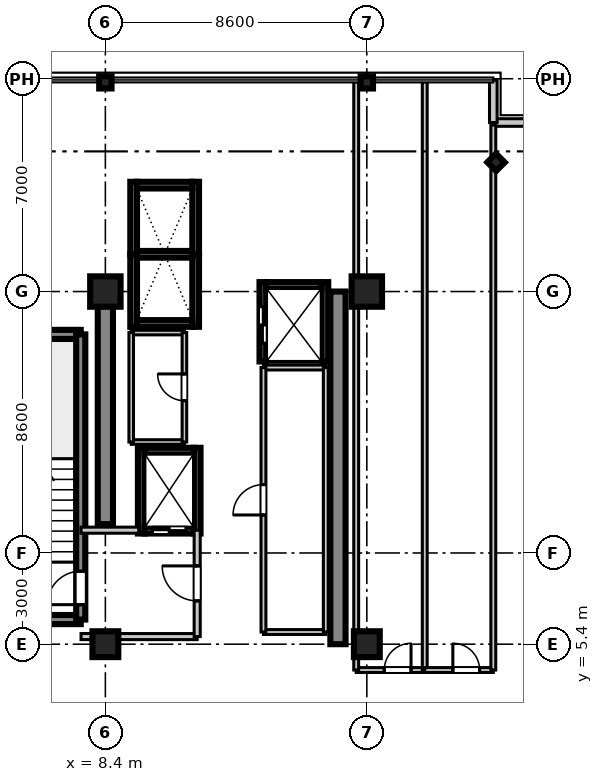
"""IFC4 building model, lengths in metres.
Left out: names, types, materials, properties, quantities, classifications, styles, units other than length and angle.
Written with IfcOpenShell. Run it as: python <this file> out.ifc"""

import sys

from ifc_helpers import new_model, si_unit, direction, frame, frame_2d, origin, origin_2d, place, context, subcontext, project, spatial, rectangle, i_section, extrude, source, transform, mapped, element, fill, save


model = new_model("IFC4")
c1 = context("Model", 3, precision=1e-05, world=origin(), true_north=direction((0.0, 1.0)))
c2 = subcontext(c1, "Body", "Model", "MODEL_VIEW")
j1 = project(units=[si_unit("LENGTHUNIT", "METRE"), si_unit("PLANEANGLEUNIT", "RADIAN")], contexts=[c1])
p1 = place(None, origin())
s1 = spatial("IfcSite", under=j1, at=p1, CompositionType="ELEMENT")
p2 = place(p1, origin())
s2 = spatial("IfcBuilding", under=s1, at=p2, CompositionType="ELEMENT")
p3 = place(p2, frame((0.0, 0.0, 204.9)))
s3 = spatial("IfcBuildingStorey", under=s2, at=p3, CompositionType="ELEMENT", Elevation=204.9)
m1 = source(origin(), c2, "Body", "SweptSolid", [
    extrude(rectangle(XDim=0.85, YDim=0.85, at=origin_2d()), origin(), (0.0, 0.0, 1.0), 3.655),
])
p4 = place(p3, frame((8.4, 5.4, 0.0), z_axis=(0.0, 0.0, 1.0), x_axis=(1.0, 0.0, 0.0)))
e1 = element("IfcColumn", 1, at=p4, inside=s3, PredefinedType="PILASTER", context=c2, shape_type="MappedRepresentation", body=[
    mapped(m1, transform((0.0, 0.0, 0.0), scale=1.0)),
])
m2 = source(origin(), c2, "Body", "SweptSolid", [
    extrude(rectangle(XDim=1.0, YDim=1.0, at=origin_2d()), origin(), (0.0, 0.0, 1.0), 3.655),
])
p5 = place(p3, frame((8.4, 17.0, 0.0), z_axis=(0.0, 0.0, 1.0), x_axis=(1.0, 0.0, 0.0)))
e2 = element("IfcColumn", 2, at=p5, inside=s3, PredefinedType="COLUMN", context=c2, shape_type="MappedRepresentation", body=[
    mapped(m2, transform((0.0, 0.0, 0.0), scale=1.0)),
])
p6 = place(p3, frame((17.0, 5.4, 0.0), z_axis=(0.0, 0.0, 1.0), x_axis=(1.0, 0.0, 0.0)))
e3 = element("IfcColumn", 3, at=p6, inside=s3, PredefinedType="PILASTER", context=c2, shape_type="MappedRepresentation", body=[
    mapped(m1, transform((0.0, 0.0, 0.0), scale=1.0)),
])
p7 = place(p3, frame((17.0, 17.0, 0.0), z_axis=(0.0, 0.0, 1.0), x_axis=(1.0, 0.0, 0.0)))
e4 = element("IfcColumn", 4, at=p7, inside=s3, PredefinedType="COLUMN", context=c2, shape_type="MappedRepresentation", body=[
    mapped(m2, transform((0.0, 0.0, 0.0), scale=1.0)),
])
m3 = source(origin(), c2, "Body", "SweptSolid", [
    extrude(i_section(OverallWidth=0.401, OverallDepth=0.406, WebThickness=0.016, FlangeThickness=0.025, at=origin_2d()), origin(), (0.0, 0.0, 1.0), 3.655),
])
for number, where, z_axis, x_axis in (
    (5, (8.4, 23.88, 0.0), (0.0, 0.0, 1.0), (0.0, 1.0, 0.0)),
    (6, (17.0, 23.88, 0.0), (0.0, 0.0, 1.0), (0.0, 1.0, 0.0)),
    (7, (21.25, 21.25, 0.0), (0.0, 0.0, 1.0), (0.707, 0.707, 0.0)),
):
    element("IfcColumn", number, at=place(p3, frame(where, z_axis=z_axis, x_axis=x_axis)), inside=s3, PredefinedType="COLUMN", context=c2, shape_type="MappedRepresentation", body=[
        mapped(m3, transform((0.0, 0.0, 0.0), scale=1.0)),
    ])
m4 = source(origin(), c2, "Body", "SweptSolid", [
    extrude(rectangle(XDim=7.65, YDim=0.5, at=frame_2d((3.825, 0.0))), origin(), (0.0, 0.0, 1.0), 3.41),
])
p8 = place(p3, frame((8.4, 9.35, 0.0), z_axis=(0.0, 0.0, 1.0), x_axis=(0.0, 1.0, 0.0)))
e8 = element("IfcWall", 8, at=p8, inside=s3, PredefinedType="SHEAR", context=c2, shape_type="MappedRepresentation", body=[
    mapped(m4, transform((0.0, 0.0, 0.0), scale=1.0)),
])
m5 = source(origin(), c2, "Body", "SweptSolid", [
    extrude(rectangle(XDim=11.6, YDim=0.5, at=frame_2d((5.8, 0.0))), origin(), (0.0, 0.0, 1.0), 3.41),
])
p9 = place(p3, frame((16.05, 5.4, 0.0), z_axis=(0.0, 0.0, 1.0), x_axis=(0.0, 1.0, 0.0)))
e9 = element("IfcWall", 9, at=p9, inside=s3, PredefinedType="SHEAR", context=c2, shape_type="MappedRepresentation", body=[
    mapped(m5, transform((0.0, 0.0, 0.0), scale=1.0)),
])
m6 = source(origin(), c2, "Body", "SweptSolid", [
    extrude(rectangle(XDim=3.98, YDim=0.3, at=frame_2d((1.99, 0.0))), origin(), (0.0, 0.0, 1.0), 3.41),
])
for number, where, z_axis, x_axis in (
    (10, (3.61, 6.21, 0.0), (0.0, 0.0, 1.0), (1.0, 0.0, 0.0)),
    (11, (3.61, 15.59, 0.0), (0.0, 0.0, 1.0), (1.0, 0.0, 0.0)),
):
    element("IfcWall", number, at=place(p3, frame(where, z_axis=z_axis, x_axis=x_axis)), inside=s3, PredefinedType="SHEAR", context=c2, shape_type="MappedRepresentation", body=[
        mapped(m6, transform((0.0, 0.0, 0.0), scale=1.0)),
    ])
m7 = source(origin(), c2, "Body", "SweptSolid", [
    extrude(rectangle(XDim=9.38, YDim=0.3, at=frame_2d((4.69, 0.0))), origin(), (0.0, 0.0, 1.0), 3.41),
])
p10 = place(p3, frame((7.59, 6.21, 0.0), z_axis=(0.0, 0.0, 1.0), x_axis=(0.0, 1.0, 0.0)))
e12 = element("IfcWall", 12, at=p10, inside=s3, PredefinedType="SHEAR", context=c2, shape_type="MappedRepresentation", body=[
    mapped(m7, transform((0.0, 0.0, 0.0), scale=1.0)),
])
p11 = place(p10, frame((0.49, 0.0, 0.0)))
e13 = element("IfcOpeningElement", 13, at=p11, cuts=e12, PredefinedType="OPENING", context=c2, shape_type="SweptSolid", body=[
    extrude(rectangle(XDim=1.1, YDim=2.15, at=frame_2d((0.55, 1.075))), frame((0.0, 0.16, 0.0), z_axis=(0.0, -1.0, 0.0), x_axis=(1.0, 0.0, 0.0)), (0.0, 0.0, 1.0), 0.32),
])
m8 = source(origin(), c2, "Body", "SweptSolid", [
    extrude(rectangle(XDim=2.385, YDim=0.22, at=frame_2d((1.192, 0.0))), origin(), (0.0, 0.0, 1.0), 3.41),
])
for number, where, z_axis, x_axis in (
    (14, (9.33, 15.84, 0.0), (0.0, 0.0, 1.0), (0.0, 1.0, 0.0)),
    (15, (11.37, 15.84, 0.0), (0.0, 0.0, 1.0), (0.0, 1.0, 0.0)),
):
    element("IfcWall", number, at=place(p3, frame(where, z_axis=z_axis, x_axis=x_axis)), inside=s3, PredefinedType="SHEAR", context=c2, shape_type="MappedRepresentation", body=[
        mapped(m8, transform((0.0, 0.0, 0.0), scale=1.0)),
    ])
m9 = source(origin(), c2, "Body", "SweptSolid", [
    extrude(rectangle(XDim=1.82, YDim=0.22, at=frame_2d((0.91, 0.0))), origin(), (0.0, 0.0, 1.0), 3.41),
])
p12 = place(p3, frame((9.44, 15.95, 0.0), z_axis=(0.0, 0.0, 1.0), x_axis=(1.0, 0.0, 0.0)))
e16 = element("IfcWall", 16, at=p12, inside=s3, PredefinedType="SHEAR", context=c2, shape_type="MappedRepresentation", body=[
    mapped(m9, transform((0.0, 0.0, 0.0), scale=1.0)),
])
m10 = source(origin(), c2, "Body", "SweptSolid", [
    extrude(rectangle(XDim=1.82, YDim=0.22, at=frame_2d((0.91, 0.0))), origin(), (0.0, 0.0, 1.0), 3.7),
])
p13 = place(p3, frame((9.44, 18.225, 0.0), z_axis=(0.0, 0.0, 1.0), x_axis=(1.0, 0.0, 0.0)))
e17 = element("IfcWall", 17, at=p13, inside=s3, PredefinedType="SHEAR", context=c2, shape_type="MappedRepresentation", body=[
    mapped(m10, transform((0.0, 0.0, 0.0), scale=1.0)),
])
for number, where, z_axis, x_axis in (
    (18, (9.33, 18.225, 0.0), (0.0, 0.0, 1.0), (0.0, 1.0, 0.0)),
    (19, (11.37, 18.225, 0.0), (0.0, 0.0, 1.0), (0.0, 1.0, 0.0)),
):
    element("IfcWall", number, at=place(p3, frame(where, z_axis=z_axis, x_axis=x_axis)), inside=s3, PredefinedType="SHEAR", context=c2, shape_type="MappedRepresentation", body=[
        mapped(m8, transform((0.0, 0.0, 0.0), scale=1.0)),
    ])
p14 = place(p3, frame((9.44, 20.5, 0.0), z_axis=(0.0, 0.0, 1.0), x_axis=(1.0, 0.0, 0.0)))
e20 = element("IfcWall", 20, at=p14, inside=s3, PredefinedType="SHEAR", context=c2, shape_type="MappedRepresentation", body=[
    mapped(m9, transform((0.0, 0.0, 0.0), scale=1.0)),
])
m11 = source(origin(), c2, "Body", "SweptSolid", [
    extrude(rectangle(XDim=2.82, YDim=0.22, at=frame_2d((1.41, 0.0))), origin(), (0.0, 0.0, 1.0), 3.41),
])
for number, where, z_axis, x_axis in (
    (21, (9.58, 9.04, 0.0), (0.0, 0.0, 1.0), (0.0, 1.0, 0.0)),
    (22, (11.42, 9.04, 0.0), (0.0, 0.0, 1.0), (0.0, 1.0, 0.0)),
):
    element("IfcWall", number, at=place(p3, frame(where, z_axis=z_axis, x_axis=x_axis)), inside=s3, PredefinedType="SHEAR", context=c2, shape_type="MappedRepresentation", body=[
        mapped(m11, transform((0.0, 0.0, 0.0), scale=1.0)),
    ])
m12 = source(origin(), c2, "Body", "SweptSolid", [
    extrude(rectangle(XDim=1.62, YDim=0.22, at=frame_2d((0.81, 0.0))), origin(), (0.0, 0.0, 1.0), 3.41),
])
p15 = place(p3, frame((9.69, 9.15, 0.0), z_axis=(0.0, 0.0, 1.0), x_axis=(1.0, 0.0, 0.0)))
e23 = element("IfcWall", 23, at=p15, inside=s3, PredefinedType="SHEAR", context=c2, shape_type="MappedRepresentation", body=[
    mapped(m12, transform((0.0, 0.0, 0.0), scale=1.0)),
])
p16 = place(p15, frame((0.26, 0.0, 0.0)))
e24 = element("IfcOpeningElement", 24, at=p16, cuts=e23, PredefinedType="OPENING", context=c2, shape_type="SweptSolid", body=[
    extrude(rectangle(XDim=1.1, YDim=2.2, at=frame_2d((0.55, 1.1))), frame((0.0, 0.12, 0.0), z_axis=(0.0, -1.0, 0.0), x_axis=(1.0, 0.0, 0.0)), (0.0, 0.0, 1.0), 0.24),
])
p17 = place(p3, frame((9.69, 11.75, 0.0), z_axis=(0.0, 0.0, 1.0), x_axis=(1.0, 0.0, 0.0)))
e25 = element("IfcWall", 25, at=p17, inside=s3, PredefinedType="SHEAR", context=c2, shape_type="MappedRepresentation", body=[
    mapped(m12, transform((0.0, 0.0, 0.0), scale=1.0)),
])
m13 = source(origin(), c2, "Body", "SweptSolid", [
    extrude(rectangle(XDim=2.61, YDim=0.22, at=frame_2d((1.305, 0.0))), origin(), (0.0, 0.0, 1.0), 3.41),
])
p18 = place(p3, frame((13.58, 14.7, 0.0), z_axis=(0.0, 0.0, 1.0), x_axis=(0.0, 1.0, 0.0)))
e26 = element("IfcWall", 26, at=p18, inside=s3, PredefinedType="SHEAR", context=c2, shape_type="MappedRepresentation", body=[
    mapped(m13, transform((0.0, 0.0, 0.0), scale=1.0)),
])
p19 = place(p18, frame((0.6, 0.0, 0.0)))
e27 = element("IfcOpeningElement", 27, at=p19, cuts=e26, PredefinedType="OPENING", context=c2, shape_type="SweptSolid", body=[
    extrude(rectangle(XDim=1.2, YDim=2.2, at=frame_2d((0.6, 1.1))), frame((0.0, 0.12, 0.0), z_axis=(0.0, -1.0, 0.0), x_axis=(1.0, 0.0, 0.0)), (0.0, 0.0, 1.0), 0.24),
])
p20 = place(p3, frame((15.62, 14.7, 0.0), z_axis=(0.0, 0.0, 1.0), x_axis=(0.0, 1.0, 0.0)))
e28 = element("IfcWall", 28, at=p20, inside=s3, PredefinedType="SHEAR", context=c2, shape_type="MappedRepresentation", body=[
    mapped(m13, transform((0.0, 0.0, 0.0), scale=1.0)),
])
p21 = place(p3, frame((13.69, 17.2, 0.0), z_axis=(0.0, 0.0, 1.0), x_axis=(1.0, 0.0, 0.0)))
e29 = element("IfcWall", 29, at=p21, inside=s3, PredefinedType="SHEAR", context=c2, shape_type="MappedRepresentation", body=[
    mapped(m9, transform((0.0, 0.0, 0.0), scale=1.0)),
])
m14 = source(origin(), c2, "Body", "SweptSolid", [
    extrude(rectangle(XDim=1.4, YDim=0.25, at=frame_2d((0.7, 0.0))), origin(), (0.0, 0.0, 1.0), 3.41),
])
p22 = place(p3, frame((21.16, 22.56, 0.0), z_axis=(0.0, 0.0, 1.0), x_axis=(1.0, 0.0, 0.0)))
e30 = element("IfcWall", 30, at=p22, inside=s3, PredefinedType="STANDARD", context=c2, shape_type="MappedRepresentation", body=[
    mapped(m14, transform((0.0, 0.0, 0.0), scale=1.0)),
])
m15 = source(origin(), c2, "Body", "SweptSolid", [
    extrude(rectangle(XDim=1.4, YDim=0.25, at=frame_2d((0.7, 0.0))), origin(), (0.0, 0.0, 1.0), 3.41),
])
p23 = place(p3, frame((21.16, 22.56, 0.0), z_axis=(0.0, 0.0, 1.0), x_axis=(0.0, 1.0, 0.0)))
e31 = element("IfcWall", 31, at=p23, inside=s3, PredefinedType="STANDARD", context=c2, shape_type="MappedRepresentation", body=[
    mapped(m15, transform((0.0, 0.0, 0.0), scale=1.0)),
])
m16 = source(origin(), c2, "Body", "SweptSolid", [
    extrude(rectangle(XDim=3.82, YDim=0.2, at=frame_2d((1.91, 0.0))), origin(), (0.0, 0.0, 1.0), 2.75),
])
p24 = place(p3, frame((7.6, 5.65, 0.0), z_axis=(0.0, 0.0, 1.0), x_axis=(1.0, 0.0, 0.0)))
e32 = element("IfcWall", 32, at=p24, inside=s3, PredefinedType="PARTITIONING", context=c2, shape_type="MappedRepresentation", body=[
    mapped(m16, transform((0.0, 0.0, 0.0), scale=1.0)),
])
m17 = source(origin(), c2, "Body", "SweptSolid", [
    extrude(rectangle(XDim=1.9, YDim=0.2, at=frame_2d((0.95, 0.0))), origin(), (0.0, 0.0, 1.0), 2.75),
])
p25 = place(p3, frame((7.6, 9.15, 0.0), z_axis=(0.0, 0.0, 1.0), x_axis=(1.0, 0.0, 0.0)))
e33 = element("IfcWall", 33, at=p25, inside=s3, PredefinedType="PARTITIONING", context=c2, shape_type="MappedRepresentation", body=[
    mapped(m17, transform((0.0, 0.0, 0.0), scale=1.0)),
])
m18 = source(origin(), c2, "Body", "SweptSolid", [
    extrude(rectangle(XDim=3.5, YDim=0.2, at=frame_2d((1.75, 0.0))), origin(), (0.0, 0.0, 1.0), 2.75),
])
p26 = place(p3, frame((11.42, 5.65, 0.0), z_axis=(0.0, 0.0, 1.0), x_axis=(0.0, 1.0, 0.0)))
e34 = element("IfcWall", 34, at=p26, inside=s3, PredefinedType="PARTITIONING", context=c2, shape_type="MappedRepresentation", body=[
    mapped(m18, transform((0.0, 0.0, 0.0), scale=1.0)),
])
p27 = place(p26, frame((1.175, 0.0, 0.0)))
e35 = element("IfcOpeningElement", 35, at=p27, cuts=e34, PredefinedType="OPENING", context=c2, shape_type="SweptSolid", body=[
    extrude(rectangle(XDim=1.15, YDim=2.15, at=frame_2d((0.575, 1.075))), frame((0.0, 0.11, 0.0), z_axis=(0.0, -1.0, 0.0), x_axis=(1.0, 0.0, 0.0)), (0.0, 0.0, 1.0), 0.22),
])
m19 = source(origin(), c2, "Body", "SweptSolid", [
    extrude(rectangle(XDim=1.75, YDim=0.15, at=frame_2d((0.875, 0.0))), origin(), (0.0, 0.0, 1.0), 2.75),
])
for number, where, z_axis, x_axis in (
    (36, (9.25, 12.05, 0.0), (0.0, 0.0, 1.0), (1.0, 0.0, 0.0)),
    (37, (9.25, 15.65, 0.0), (0.0, 0.0, 1.0), (1.0, 0.0, 0.0)),
):
    element("IfcWall", number, at=place(p3, frame(where, z_axis=z_axis, x_axis=x_axis)), inside=s3, PredefinedType="PARTITIONING", context=c2, shape_type="MappedRepresentation", body=[
        mapped(m19, transform((0.0, 0.0, 0.0), scale=1.0)),
    ])
m20 = source(origin(), c2, "Body", "SweptSolid", [
    extrude(rectangle(XDim=3.6, YDim=0.15, at=frame_2d((1.8, 0.0))), origin(), (0.0, 0.0, 1.0), 2.75),
])
p28 = place(p3, frame((9.25, 12.05, 0.0), z_axis=(0.0, 0.0, 1.0), x_axis=(0.0, 1.0, 0.0)))
e38 = element("IfcWall", 38, at=p28, inside=s3, PredefinedType="PARTITIONING", context=c2, shape_type="MappedRepresentation", body=[
    mapped(m20, transform((0.0, 0.0, 0.0), scale=1.0)),
])
p29 = place(p3, frame((11.0, 12.05, 0.0), z_axis=(0.0, 0.0, 1.0), x_axis=(0.0, 1.0, 0.0)))
e39 = element("IfcWall", 39, at=p29, inside=s3, PredefinedType="PARTITIONING", context=c2, shape_type="MappedRepresentation", body=[
    mapped(m20, transform((0.0, 0.0, 0.0), scale=1.0)),
])
p30 = place(p29, frame((1.36, 0.0, 0.0)))
e40 = element("IfcOpeningElement", 40, at=p30, cuts=e39, PredefinedType="OPENING", context=c2, shape_type="SweptSolid", body=[
    extrude(rectangle(XDim=0.88, YDim=2.1, at=frame_2d((0.44, 1.05))), frame((0.0, 0.085, 0.0), z_axis=(0.0, -1.0, 0.0), x_axis=(1.0, 0.0, 0.0)), (0.0, 0.0, 1.0), 0.17),
])
m21 = source(origin(), c2, "Body", "SweptSolid", [
    extrude(rectangle(XDim=2.05, YDim=0.16, at=frame_2d((1.025, 0.0))), origin(), (0.0, 0.0, 1.0), 2.75),
])
for number, where, z_axis, x_axis in (
    (41, (13.6, 5.8, 0.0), (0.0, 0.0, 1.0), (1.0, 0.0, 0.0)),
    (42, (13.6, 14.5, 0.0), (0.0, 0.0, 1.0), (1.0, 0.0, 0.0)),
):
    element("IfcWall", number, at=place(p3, frame(where, z_axis=z_axis, x_axis=x_axis)), inside=s3, PredefinedType="PARTITIONING", context=c2, shape_type="MappedRepresentation", body=[
        mapped(m21, transform((0.0, 0.0, 0.0), scale=1.0)),
    ])
m22 = source(origin(), c2, "Body", "SweptSolid", [
    extrude(rectangle(XDim=8.7, YDim=0.16, at=frame_2d((4.35, 0.0))), origin(), (0.0, 0.0, 1.0), 2.75),
])
p31 = place(p3, frame((13.6, 5.8, 0.0), z_axis=(0.0, 0.0, 1.0), x_axis=(0.0, 1.0, 0.0)))
e43 = element("IfcWall", 43, at=p31, inside=s3, PredefinedType="PARTITIONING", context=c2, shape_type="MappedRepresentation", body=[
    mapped(m22, transform((0.0, 0.0, 0.0), scale=1.0)),
])
p32 = place(p31, frame((3.85, 0.0, 0.0)))
e44 = element("IfcOpeningElement", 44, at=p32, cuts=e43, PredefinedType="OPENING", context=c2, shape_type="SweptSolid", body=[
    extrude(rectangle(XDim=1.0, YDim=2.1, at=frame_2d((0.5, 1.05))), frame((0.0, 0.09, 0.0), z_axis=(0.0, -1.0, 0.0), x_axis=(1.0, 0.0, 0.0)), (0.0, 0.0, 1.0), 0.18),
])
p33 = place(p3, frame((15.65, 5.8, 0.0), z_axis=(0.0, 0.0, 1.0), x_axis=(0.0, 1.0, 0.0)))
e45 = element("IfcWall", 45, at=p33, inside=s3, PredefinedType="PARTITIONING", context=c2, shape_type="MappedRepresentation", body=[
    mapped(m22, transform((0.0, 0.0, 0.0), scale=1.0)),
])
m23 = source(origin(), c2, "Body", "SweptSolid", [
    extrude(rectangle(XDim=2.255, YDim=0.16, at=frame_2d((1.127, 0.0))), origin(), (0.0, 0.0, 1.0), 2.75),
])
p34 = place(p3, frame((16.65, 4.55, 0.0), z_axis=(0.0, 0.0, 1.0), x_axis=(1.0, 0.0, 0.0)))
e46 = element("IfcWall", 46, at=p34, inside=s3, PredefinedType="PARTITIONING", context=c2, shape_type="MappedRepresentation", body=[
    mapped(m23, transform((0.0, 0.0, 0.0), scale=1.0)),
])
p35 = place(p34, frame((0.924, 0.0, 0.0)))
e47 = element("IfcOpeningElement", 47, at=p35, cuts=e46, PredefinedType="OPENING", context=c2, shape_type="SweptSolid", body=[
    extrude(rectangle(XDim=0.88, YDim=2.1, at=frame_2d((0.44, 1.05))), frame((0.0, 0.09, 0.0), z_axis=(0.0, -1.0, 0.0), x_axis=(1.0, 0.0, 0.0)), (0.0, 0.0, 1.0), 0.18),
])
m24 = source(origin(), c2, "Body", "SweptSolid", [
    extrude(rectangle(XDim=19.35, YDim=0.16, at=frame_2d((9.675, 0.0))), origin(), (0.0, 0.0, 1.0), 2.75),
])
for number, where, z_axis, x_axis in (
    (48, (16.65, 4.55, 0.0), (0.0, 0.0, 1.0), (0.0, 1.0, 0.0)),
    (49, (18.905, 4.55, 0.0), (0.0, 0.0, 1.0), (0.0, 1.0, 0.0)),
):
    element("IfcWall", number, at=place(p3, frame(where, z_axis=z_axis, x_axis=x_axis)), inside=s3, PredefinedType="PARTITIONING", context=c2, shape_type="MappedRepresentation", body=[
        mapped(m24, transform((0.0, 0.0, 0.0), scale=1.0)),
    ])
m25 = source(origin(), c2, "Body", "SweptSolid", [
    extrude(rectangle(XDim=2.255, YDim=0.16, at=frame_2d((1.127, 0.0))), origin(), (0.0, 0.0, 1.0), 2.75),
])
p36 = place(p3, frame((18.905, 4.55, 0.0), z_axis=(0.0, 0.0, 1.0), x_axis=(1.0, 0.0, 0.0)))
e50 = element("IfcWall", 50, at=p36, inside=s3, PredefinedType="PARTITIONING", context=c2, shape_type="MappedRepresentation", body=[
    mapped(m25, transform((0.0, 0.0, 0.0), scale=1.0)),
])
p37 = place(p36, frame((0.924, 0.0, 0.0)))
e51 = element("IfcOpeningElement", 51, at=p37, cuts=e50, PredefinedType="OPENING", context=c2, shape_type="SweptSolid", body=[
    extrude(rectangle(XDim=0.88, YDim=2.1, at=frame_2d((0.44, 1.05))), frame((0.0, 0.09, 0.0), z_axis=(0.0, -1.0, 0.0), x_axis=(1.0, 0.0, 0.0)), (0.0, 0.0, 1.0), 0.18),
])
m26 = source(origin(), c2, "Body", "SweptSolid", [
    extrude(rectangle(XDim=17.93, YDim=0.16, at=frame_2d((8.965, 0.0))), origin(), (0.0, 0.0, 1.0), 2.75),
])
p38 = place(p3, frame((21.16, 4.55, 0.0), z_axis=(0.0, 0.0, 1.0), x_axis=(0.0, 1.0, 0.0)))
e52 = element("IfcWall", 52, at=p38, inside=s3, PredefinedType="PARTITIONING", context=c2, shape_type="MappedRepresentation", body=[
    mapped(m26, transform((0.0, 0.0, 0.0), scale=1.0)),
])
m27 = source(origin(), c2, "Body", "SweptSolid", [
    extrude(rectangle(XDim=1.1, YDim=2.15, at=frame_2d((0.55, 1.075))), frame((0.0, 0.025, 0.0), z_axis=(0.0, -1.0, 0.0), x_axis=(1.0, 0.0, 0.0)), (0.0, 0.0, 1.0), 0.05),
])
p39 = place(p11, origin())
e53 = element("IfcDoor", 53, at=p39, inside=s3, OperationType="SINGLE_SWING_LEFT", PredefinedType="DOOR", context=c2, shape_type="MappedRepresentation", body=[
    mapped(m27, transform((0.0, 0.0, 0.0), scale=1.0)),
])
fill(e13, e53)
m28 = source(origin(), c2, "Body", "SweptSolid", [
    extrude(rectangle(XDim=1.1, YDim=2.2, at=frame_2d((0.55, 1.1))), frame((0.0, 0.025, 0.0), z_axis=(0.0, -1.0, 0.0), x_axis=(1.0, 0.0, 0.0)), (0.0, 0.0, 1.0), 0.05),
])
p40 = place(p16, frame((1.1, 0.0, 0.0), z_axis=(0.0, 0.0, 1.0), x_axis=(-1.0, 0.0, 0.0)))
e54 = element("IfcDoor", 54, at=p40, inside=s3, OperationType="DOUBLE_DOOR_SLIDING", PredefinedType="DOOR", context=c2, shape_type="MappedRepresentation", body=[
    mapped(m28, transform((0.0, 0.0, 0.0), scale=1.0)),
])
fill(e24, e54)
m29 = source(origin(), c2, "Body", "SweptSolid", [
    extrude(rectangle(XDim=1.2, YDim=2.2, at=frame_2d((0.6, 1.1))), frame((0.0, 0.025, 0.0), z_axis=(0.0, -1.0, 0.0), x_axis=(1.0, 0.0, 0.0)), (0.0, 0.0, 1.0), 0.05),
])
p41 = place(p19, origin())
e55 = element("IfcDoor", 55, at=p41, inside=s3, OperationType="DOUBLE_DOOR_SLIDING", PredefinedType="DOOR", context=c2, shape_type="MappedRepresentation", body=[
    mapped(m29, transform((0.0, 0.0, 0.0), scale=1.0)),
])
fill(e27, e55)
m30 = source(origin(), c2, "Body", "SweptSolid", [
    extrude(rectangle(XDim=1.15, YDim=2.15, at=frame_2d((0.575, 1.075))), frame((0.0, 0.025, 0.0), z_axis=(0.0, -1.0, 0.0), x_axis=(1.0, 0.0, 0.0)), (0.0, 0.0, 1.0), 0.05),
])
p42 = place(p27, frame((1.15, 0.0, 0.0), z_axis=(0.0, 0.0, 1.0), x_axis=(-1.0, 0.0, 0.0)))
e56 = element("IfcDoor", 56, at=p42, inside=s3, OperationType="SINGLE_SWING_RIGHT", PredefinedType="DOOR", context=c2, shape_type="MappedRepresentation", body=[
    mapped(m30, transform((0.0, 0.0, 0.0), scale=1.0)),
])
fill(e35, e56)
m31 = source(origin(), c2, "Body", "SweptSolid", [
    extrude(rectangle(XDim=0.88, YDim=2.1, at=frame_2d((0.44, 1.05))), frame((0.0, 0.025, 0.0), z_axis=(0.0, -1.0, 0.0), x_axis=(1.0, 0.0, 0.0)), (0.0, 0.0, 1.0), 0.05),
])
p43 = place(p30, origin())
e57 = element("IfcDoor", 57, at=p43, inside=s3, OperationType="SINGLE_SWING_RIGHT", PredefinedType="DOOR", context=c2, shape_type="MappedRepresentation", body=[
    mapped(m31, transform((0.0, 0.0, 0.0), scale=1.0)),
])
fill(e40, e57)
m32 = source(origin(), c2, "Body", "SweptSolid", [
    extrude(rectangle(XDim=1.0, YDim=2.1, at=frame_2d((0.5, 1.05))), frame((0.0, 0.025, 0.0), z_axis=(0.0, -1.0, 0.0), x_axis=(1.0, 0.0, 0.0)), (0.0, 0.0, 1.0), 0.05),
])
p44 = place(p32, frame((1.0, 0.0, 0.0), z_axis=(0.0, 0.0, 1.0), x_axis=(-1.0, 0.0, 0.0)))
e58 = element("IfcDoor", 58, at=p44, inside=s3, OperationType="SINGLE_SWING_LEFT", PredefinedType="DOOR", context=c2, shape_type="MappedRepresentation", body=[
    mapped(m32, transform((0.0, 0.0, 0.0), scale=1.0)),
])
fill(e44, e58)
p45 = place(p35, origin())
e59 = element("IfcDoor", 59, at=p45, inside=s3, OperationType="SINGLE_SWING_RIGHT", PredefinedType="DOOR", context=c2, shape_type="MappedRepresentation", body=[
    mapped(m31, transform((0.0, 0.0, 0.0), scale=1.0)),
])
fill(e47, e59)
p46 = place(p37, origin())
e60 = element("IfcDoor", 60, at=p46, inside=s3, OperationType="SINGLE_SWING_LEFT", PredefinedType="DOOR", context=c2, shape_type="MappedRepresentation", body=[
    mapped(m31, transform((0.0, 0.0, 0.0), scale=1.0)),
])
fill(e51, e60)
save(model, sys.argv[1])
